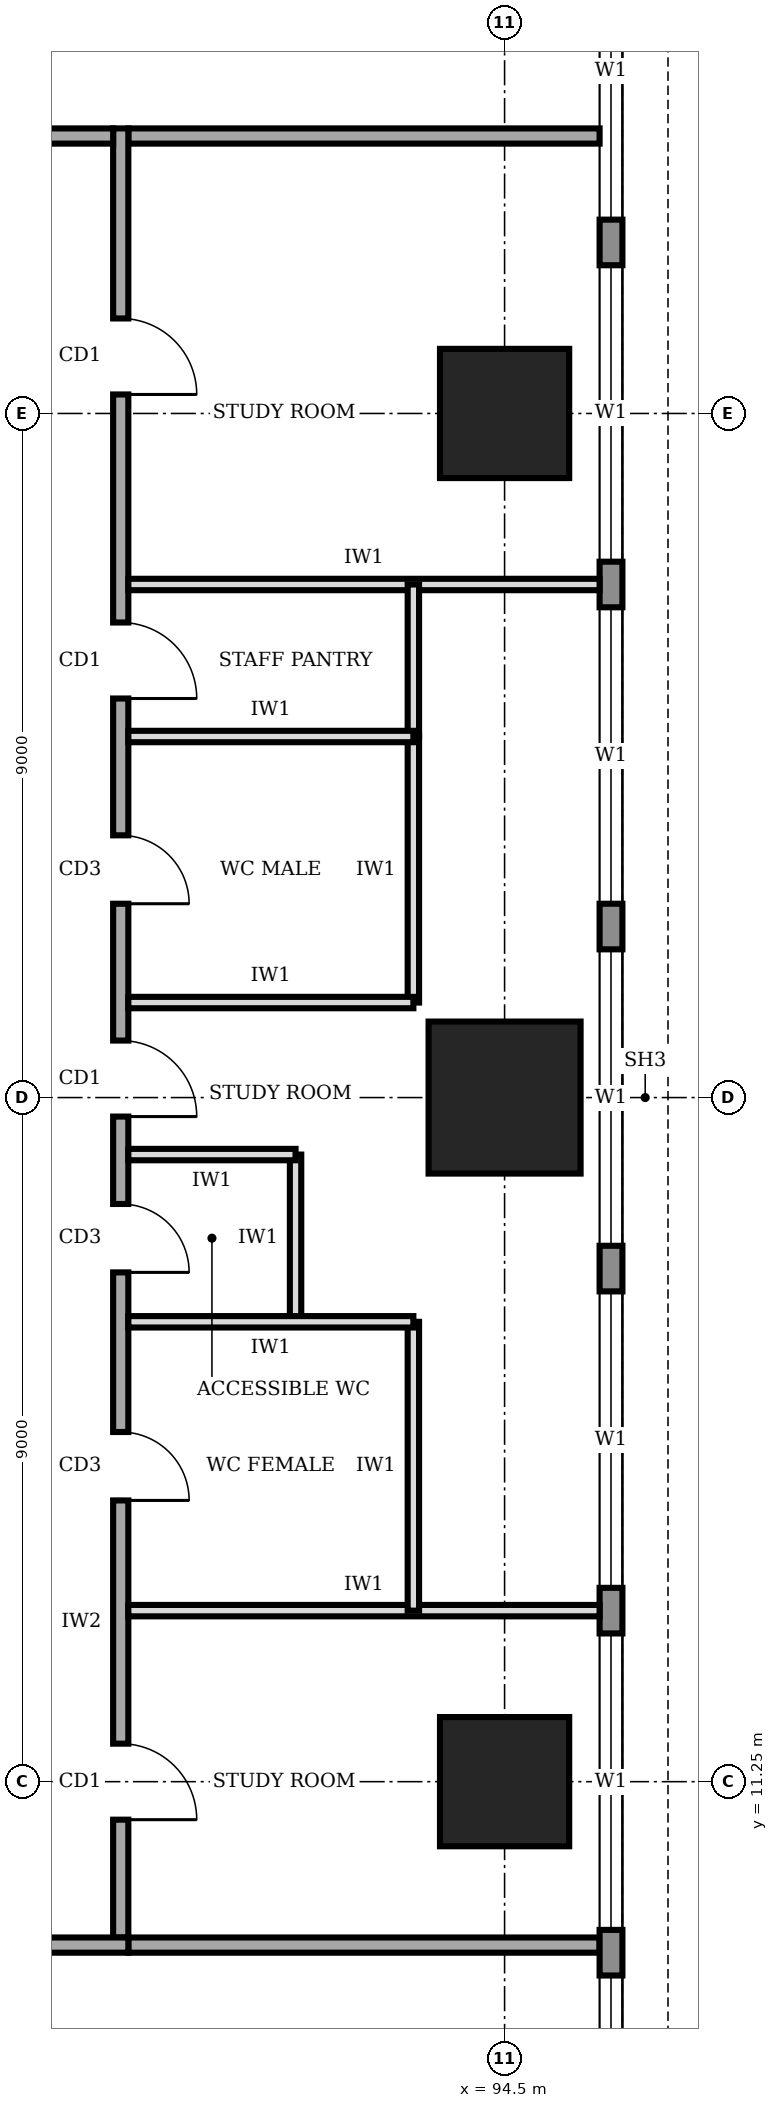
"""IFC4 building model, lengths in metres.
Left out: names, types, materials, properties, quantities, classifications, styles, units other than length and angle.
Written with IfcOpenShell. Run it as: python <this file> out.ifc"""

import sys

from ifc_helpers import new_model, si_unit, direction, frame, frame_2d, origin, origin_2d, place, context, subcontext, project, spatial, rectangle, extrude, element, fill, save


model = new_model("IFC4")
c1 = context("Model", 3, precision=1e-05, world=origin(), true_north=direction((0.0, 1.0)))
c2 = subcontext(c1, "Body", "Model", "MODEL_VIEW")
j1 = project(units=[si_unit("LENGTHUNIT", "METRE"), si_unit("PLANEANGLEUNIT", "RADIAN")], contexts=[c1])
p1 = place(None, origin())
s1 = spatial("IfcSite", under=j1, at=p1, CompositionType="ELEMENT")
p2 = place(p1, origin())
s2 = spatial("IfcBuilding", under=s1, at=p2, CompositionType="ELEMENT")
p3 = place(p2, frame((0.0, 0.0, 225.0)))
s3 = spatial("IfcBuildingStorey", under=s2, at=p3, CompositionType="ELEMENT", Elevation=225.0)
p4 = place(p3, frame((94.5, 11.25, 0.0), z_axis=(0.0, 0.0, 1.0), x_axis=(1.0, 0.0, 0.0)))
e1 = element("IfcColumn", 1, at=p4, inside=s3, PredefinedType="COLUMN", context=c2, shape_type="SweptSolid", body=[
    extrude(rectangle(XDim=1.7, YDim=1.7, at=origin_2d()), origin(), (0.0, 0.0, 1.0), 4.0),
])
p5 = place(p3, frame((94.5, 20.25, 0.0), z_axis=(0.0, 0.0, 1.0), x_axis=(1.0, 0.0, 0.0)))
e2 = element("IfcColumn", 2, at=p5, inside=s3, PredefinedType="COLUMN", context=c2, shape_type="SweptSolid", body=[
    extrude(rectangle(XDim=2.0, YDim=2.0, at=origin_2d()), origin(), (0.0, 0.0, 1.0), 4.0),
])
p6 = place(p3, frame((94.5, 29.25, 0.0), z_axis=(0.0, 0.0, 1.0), x_axis=(1.0, 0.0, 0.0)))
e3 = element("IfcColumn", 3, at=p6, inside=s3, PredefinedType="COLUMN", context=c2, shape_type="SweptSolid", body=[
    extrude(rectangle(XDim=1.7, YDim=1.7, at=origin_2d()), origin(), (0.0, 0.0, 1.0), 4.0),
])
p7 = place(p3, frame((95.9, 3.32, 0.0), z_axis=(0.0, 0.0, 1.0), x_axis=(0.0, 1.0, 0.0)))
e4 = element("IfcWall", 4, at=p7, inside=s3, PredefinedType="STANDARD", context=c2, shape_type="SweptSolid", body=[
    extrude(rectangle(XDim=33.86, YDim=0.3, at=frame_2d((16.93, 0.0))), origin(), (0.0, 0.0, 1.0), 3.75),
])
p8 = place(p7, frame((1.48, 0.0, 0.9)))
e5 = element("IfcOpeningElement", 5, at=p8, cuts=e4, PredefinedType="OPENING", context=c2, shape_type="SweptSolid", body=[
    extrude(rectangle(XDim=3.9, YDim=2.2, at=frame_2d((1.95, 1.1))), frame((0.0, 0.16, 0.0), z_axis=(0.0, -1.0, 0.0), x_axis=(1.0, 0.0, 0.0)), (0.0, 0.0, 1.0), 0.32),
])
p9 = place(p7, frame((5.98, 0.0, 0.9)))
e6 = element("IfcOpeningElement", 6, at=p9, cuts=e4, PredefinedType="OPENING", context=c2, shape_type="SweptSolid", body=[
    extrude(rectangle(XDim=3.9, YDim=2.2, at=frame_2d((1.95, 1.1))), frame((0.0, 0.16, 0.0), z_axis=(0.0, -1.0, 0.0), x_axis=(1.0, 0.0, 0.0)), (0.0, 0.0, 1.0), 0.32),
])
p10 = place(p7, frame((10.48, 0.0, 0.9)))
e7 = element("IfcOpeningElement", 7, at=p10, cuts=e4, PredefinedType="OPENING", context=c2, shape_type="SweptSolid", body=[
    extrude(rectangle(XDim=3.9, YDim=2.2, at=frame_2d((1.95, 1.1))), frame((0.0, 0.16, 0.0), z_axis=(0.0, -1.0, 0.0), x_axis=(1.0, 0.0, 0.0)), (0.0, 0.0, 1.0), 0.32),
])
p11 = place(p7, frame((14.98, 0.0, 0.9)))
e8 = element("IfcOpeningElement", 8, at=p11, cuts=e4, PredefinedType="OPENING", context=c2, shape_type="SweptSolid", body=[
    extrude(rectangle(XDim=3.9, YDim=2.2, at=frame_2d((1.95, 1.1))), frame((0.0, 0.16, 0.0), z_axis=(0.0, -1.0, 0.0), x_axis=(1.0, 0.0, 0.0)), (0.0, 0.0, 1.0), 0.32),
])
p12 = place(p7, frame((19.48, 0.0, 0.9)))
e9 = element("IfcOpeningElement", 9, at=p12, cuts=e4, PredefinedType="OPENING", context=c2, shape_type="SweptSolid", body=[
    extrude(rectangle(XDim=3.9, YDim=2.2, at=frame_2d((1.95, 1.1))), frame((0.0, 0.16, 0.0), z_axis=(0.0, -1.0, 0.0), x_axis=(1.0, 0.0, 0.0)), (0.0, 0.0, 1.0), 0.32),
])
p13 = place(p7, frame((23.98, 0.0, 0.9)))
e10 = element("IfcOpeningElement", 10, at=p13, cuts=e4, PredefinedType="OPENING", context=c2, shape_type="SweptSolid", body=[
    extrude(rectangle(XDim=3.9, YDim=2.2, at=frame_2d((1.95, 1.1))), frame((0.0, 0.16, 0.0), z_axis=(0.0, -1.0, 0.0), x_axis=(1.0, 0.0, 0.0)), (0.0, 0.0, 1.0), 0.32),
])
p14 = place(p7, frame((28.48, 0.0, 0.9)))
e11 = element("IfcOpeningElement", 11, at=p14, cuts=e4, PredefinedType="OPENING", context=c2, shape_type="SweptSolid", body=[
    extrude(rectangle(XDim=3.9, YDim=2.2, at=frame_2d((1.95, 1.1))), frame((0.0, 0.16, 0.0), z_axis=(0.0, -1.0, 0.0), x_axis=(1.0, 0.0, 0.0)), (0.0, 0.0, 1.0), 0.32),
])
p15 = place(p3, frame((72.65, 9.1, 0.0), z_axis=(0.0, 0.0, 1.0), x_axis=(1.0, 0.0, 0.0)))
e12 = element("IfcWall", 12, at=p15, inside=s3, PredefinedType="SOLIDWALL", context=c2, shape_type="SweptSolid", body=[
    extrude(rectangle(XDim=16.9, YDim=0.2, at=frame_2d((8.45, 0.0))), origin(), (0.0, 0.0, 1.0), 3.75),
])
p16 = place(p3, frame((89.45, 9.2, 0.0), z_axis=(0.0, 0.0, 1.0), x_axis=(0.0, 1.0, 0.0)))
e13 = element("IfcWall", 13, at=p16, inside=s3, PredefinedType="SOLIDWALL", context=c2, shape_type="SweptSolid", body=[
    extrude(rectangle(XDim=23.8, YDim=0.2, at=frame_2d((11.9, 0.0))), origin(), (0.0, 0.0, 1.0), 3.75),
])
p17 = place(p16, frame((1.55, 0.0, 0.0)))
e14 = element("IfcOpeningElement", 14, at=p17, cuts=e13, PredefinedType="OPENING", context=c2, shape_type="SweptSolid", body=[
    extrude(rectangle(XDim=1.0, YDim=2.1, at=frame_2d((0.5, 1.05))), frame((0.0, 0.11, 0.0), z_axis=(0.0, -1.0, 0.0), x_axis=(1.0, 0.0, 0.0)), (0.0, 0.0, 1.0), 0.22),
])
p18 = place(p16, frame((5.75, 0.0, 0.0)))
e15 = element("IfcOpeningElement", 15, at=p18, cuts=e13, PredefinedType="OPENING", context=c2, shape_type="SweptSolid", body=[
    extrude(rectangle(XDim=0.9, YDim=2.1, at=frame_2d((0.45, 1.05))), frame((0.0, 0.11, 0.0), z_axis=(0.0, -1.0, 0.0), x_axis=(1.0, 0.0, 0.0)), (0.0, 0.0, 1.0), 0.22),
])
p19 = place(p16, frame((8.75, 0.0, 0.0)))
e16 = element("IfcOpeningElement", 16, at=p19, cuts=e13, PredefinedType="OPENING", context=c2, shape_type="SweptSolid", body=[
    extrude(rectangle(XDim=0.9, YDim=2.1, at=frame_2d((0.45, 1.05))), frame((0.0, 0.11, 0.0), z_axis=(0.0, -1.0, 0.0), x_axis=(1.0, 0.0, 0.0)), (0.0, 0.0, 1.0), 0.22),
])
p20 = place(p16, frame((13.6, 0.0, 0.0)))
e17 = element("IfcOpeningElement", 17, at=p20, cuts=e13, PredefinedType="OPENING", context=c2, shape_type="SweptSolid", body=[
    extrude(rectangle(XDim=0.9, YDim=2.1, at=frame_2d((0.45, 1.05))), frame((0.0, 0.11, 0.0), z_axis=(0.0, -1.0, 0.0), x_axis=(1.0, 0.0, 0.0)), (0.0, 0.0, 1.0), 0.22),
])
p21 = place(p16, frame((16.3, 0.0, 0.0)))
e18 = element("IfcOpeningElement", 18, at=p21, cuts=e13, PredefinedType="OPENING", context=c2, shape_type="SweptSolid", body=[
    extrude(rectangle(XDim=1.0, YDim=2.1, at=frame_2d((0.5, 1.05))), frame((0.0, 0.11, 0.0), z_axis=(0.0, -1.0, 0.0), x_axis=(1.0, 0.0, 0.0)), (0.0, 0.0, 1.0), 0.22),
])
p22 = place(p16, frame((10.8, 0.0, 0.0)))
e19 = element("IfcOpeningElement", 19, at=p22, cuts=e13, PredefinedType="OPENING", context=c2, shape_type="SweptSolid", body=[
    extrude(rectangle(XDim=1.0, YDim=2.1, at=frame_2d((0.5, 1.05))), frame((0.0, 0.11, 0.0), z_axis=(0.0, -1.0, 0.0), x_axis=(1.0, 0.0, 0.0)), (0.0, 0.0, 1.0), 0.22),
])
p23 = place(p16, frame((20.3, 0.0, 0.0)))
e20 = element("IfcOpeningElement", 20, at=p23, cuts=e13, PredefinedType="OPENING", context=c2, shape_type="SweptSolid", body=[
    extrude(rectangle(XDim=1.0, YDim=2.1, at=frame_2d((0.5, 1.05))), frame((0.0, 0.11, 0.0), z_axis=(0.0, -1.0, 0.0), x_axis=(1.0, 0.0, 0.0)), (0.0, 0.0, 1.0), 0.22),
])
p24 = place(p3, frame((89.35, 32.9, 0.0), z_axis=(0.0, 0.0, 1.0), x_axis=(-1.0, 0.0, 0.0)))
e21 = element("IfcWall", 21, at=p24, inside=s3, PredefinedType="SOLIDWALL", context=c2, shape_type="SweptSolid", body=[
    extrude(rectangle(XDim=16.9, YDim=0.2, at=frame_2d((8.45, 0.0))), origin(), (0.0, 0.0, 1.0), 3.75),
])
p25 = place(p24, frame((14.375, 0.0, 0.0)))
e22 = element("IfcOpeningElement", 22, at=p25, cuts=e21, PredefinedType="OPENING", context=c2, shape_type="SweptSolid", body=[
    extrude(rectangle(XDim=1.0, YDim=2.1, at=frame_2d((0.5, 1.05))), frame((0.0, 0.11, 0.0), z_axis=(0.0, -1.0, 0.0), x_axis=(1.0, 0.0, 0.0)), (0.0, 0.0, 1.0), 0.22),
])
p26 = place(p24, frame((1.325, 0.0, 0.0)))
e23 = element("IfcOpeningElement", 23, at=p26, cuts=e21, PredefinedType="OPENING", context=c2, shape_type="SweptSolid", body=[
    extrude(rectangle(XDim=1.0, YDim=2.1, at=frame_2d((0.5, 1.05))), frame((0.0, 0.11, 0.0), z_axis=(0.0, -1.0, 0.0), x_axis=(1.0, 0.0, 0.0)), (0.0, 0.0, 1.0), 0.22),
])
for number, where, z_axis, x_axis in (
    (24, (89.55, 9.1, 0.0), (0.0, 0.0, 1.0), (1.0, 0.0, 0.0)),
    (25, (89.55, 32.9, 0.0), (0.0, 0.0, 1.0), (1.0, 0.0, 0.0)),
):
    element("IfcWall", number, at=place(p3, frame(where, z_axis=z_axis, x_axis=x_axis)), inside=s3, PredefinedType="SOLIDWALL", context=c2, shape_type="SweptSolid", body=[
        extrude(rectangle(XDim=6.2, YDim=0.2, at=frame_2d((3.1, 0.0))), origin(), (0.0, 0.0, 1.0), 3.75),
    ])
for number, where, z_axis, x_axis in (
    (26, (89.55, 13.5, 0.0), (0.0, 0.0, 1.0), (1.0, 0.0, 0.0)),
    (27, (89.55, 27.0, 0.0), (0.0, 0.0, 1.0), (1.0, 0.0, 0.0)),
):
    element("IfcWall", number, at=place(p3, frame(where, z_axis=z_axis, x_axis=x_axis)), inside=s3, PredefinedType="PARTITIONING", context=c2, shape_type="SweptSolid", body=[
        extrude(rectangle(XDim=6.2, YDim=0.15, at=frame_2d((3.1, 0.0))), origin(), (0.0, 0.0, 1.0), 3.75),
    ])
p27 = place(p3, frame((89.55, 17.3, 0.0), z_axis=(0.0, 0.0, 1.0), x_axis=(1.0, 0.0, 0.0)))
e28 = element("IfcWall", 28, at=p27, inside=s3, PredefinedType="PARTITIONING", context=c2, shape_type="SweptSolid", body=[
    extrude(rectangle(XDim=3.75, YDim=0.15, at=frame_2d((1.875, 0.0))), origin(), (0.0, 0.0, 1.0), 3.75),
])
p28 = place(p3, frame((89.55, 19.5, 0.0), z_axis=(0.0, 0.0, 1.0), x_axis=(1.0, 0.0, 0.0)))
e29 = element("IfcWall", 29, at=p28, inside=s3, PredefinedType="PARTITIONING", context=c2, shape_type="SweptSolid", body=[
    extrude(rectangle(XDim=2.2, YDim=0.15, at=frame_2d((1.1, 0.0))), origin(), (0.0, 0.0, 1.0), 2.85),
])
for number, where, z_axis, x_axis in (
    (30, (89.55, 21.5, 0.0), (0.0, 0.0, 1.0), (1.0, 0.0, 0.0)),
    (31, (89.55, 25.0, 0.0), (0.0, 0.0, 1.0), (1.0, 0.0, 0.0)),
):
    element("IfcWall", number, at=place(p3, frame(where, z_axis=z_axis, x_axis=x_axis)), inside=s3, PredefinedType="PARTITIONING", context=c2, shape_type="SweptSolid", body=[
        extrude(rectangle(XDim=3.75, YDim=0.15, at=frame_2d((1.875, 0.0))), origin(), (0.0, 0.0, 1.0), 3.75),
    ])
p29 = place(p3, frame((93.3, 13.5, 0.0), z_axis=(0.0, 0.0, 1.0), x_axis=(0.0, 1.0, 0.0)))
e32 = element("IfcWall", 32, at=p29, inside=s3, PredefinedType="PARTITIONING", context=c2, shape_type="SweptSolid", body=[
    extrude(rectangle(XDim=3.8, YDim=0.15, at=frame_2d((1.9, 0.0))), origin(), (0.0, 0.0, 1.0), 3.75),
])
p30 = place(p3, frame((91.75, 17.3, 0.0), z_axis=(0.0, 0.0, 1.0), x_axis=(0.0, 1.0, 0.0)))
e33 = element("IfcWall", 33, at=p30, inside=s3, PredefinedType="PARTITIONING", context=c2, shape_type="SweptSolid", body=[
    extrude(rectangle(XDim=2.2, YDim=0.15, at=frame_2d((1.1, 0.0))), origin(), (0.0, 0.0, 1.0), 3.75),
])
p31 = place(p3, frame((93.3, 21.5, 0.0), z_axis=(0.0, 0.0, 1.0), x_axis=(0.0, 1.0, 0.0)))
e34 = element("IfcWall", 34, at=p31, inside=s3, PredefinedType="PARTITIONING", context=c2, shape_type="SweptSolid", body=[
    extrude(rectangle(XDim=3.5, YDim=0.15, at=frame_2d((1.75, 0.0))), origin(), (0.0, 0.0, 1.0), 3.75),
])
p32 = place(p3, frame((93.3, 25.0, 0.0), z_axis=(0.0, 0.0, 1.0), x_axis=(0.0, 1.0, 0.0)))
e35 = element("IfcWall", 35, at=p32, inside=s3, PredefinedType="PARTITIONING", context=c2, shape_type="SweptSolid", body=[
    extrude(rectangle(XDim=2.0, YDim=0.15, at=frame_2d((1.0, 0.0))), origin(), (0.0, 0.0, 1.0), 3.75),
])
p33 = place(p8, origin())
e36 = element("IfcWindow", 36, at=p33, inside=s3, PartitioningType="SINGLE_PANEL", PredefinedType="WINDOW", context=c2, shape_type="SweptSolid", body=[
    extrude(rectangle(XDim=3.9, YDim=2.2, at=frame_2d((1.95, 1.1))), frame((0.0, 0.03, 0.0), z_axis=(0.0, -1.0, 0.0), x_axis=(1.0, 0.0, 0.0)), (0.0, 0.0, 1.0), 0.06),
])
fill(e5, e36)
p34 = place(p9, origin())
e37 = element("IfcWindow", 37, at=p34, inside=s3, PartitioningType="SINGLE_PANEL", PredefinedType="WINDOW", context=c2, shape_type="SweptSolid", body=[
    extrude(rectangle(XDim=3.9, YDim=2.2, at=frame_2d((1.95, 1.1))), frame((0.0, 0.03, 0.0), z_axis=(0.0, -1.0, 0.0), x_axis=(1.0, 0.0, 0.0)), (0.0, 0.0, 1.0), 0.06),
])
fill(e6, e37)
p35 = place(p10, origin())
e38 = element("IfcWindow", 38, at=p35, inside=s3, PartitioningType="SINGLE_PANEL", PredefinedType="WINDOW", context=c2, shape_type="SweptSolid", body=[
    extrude(rectangle(XDim=3.9, YDim=2.2, at=frame_2d((1.95, 1.1))), frame((0.0, 0.03, 0.0), z_axis=(0.0, -1.0, 0.0), x_axis=(1.0, 0.0, 0.0)), (0.0, 0.0, 1.0), 0.06),
])
fill(e7, e38)
p36 = place(p11, origin())
e39 = element("IfcWindow", 39, at=p36, inside=s3, PartitioningType="SINGLE_PANEL", PredefinedType="WINDOW", context=c2, shape_type="SweptSolid", body=[
    extrude(rectangle(XDim=3.9, YDim=2.2, at=frame_2d((1.95, 1.1))), frame((0.0, 0.03, 0.0), z_axis=(0.0, -1.0, 0.0), x_axis=(1.0, 0.0, 0.0)), (0.0, 0.0, 1.0), 0.06),
])
fill(e8, e39)
p37 = place(p12, origin())
e40 = element("IfcWindow", 40, at=p37, inside=s3, PartitioningType="SINGLE_PANEL", PredefinedType="WINDOW", context=c2, shape_type="SweptSolid", body=[
    extrude(rectangle(XDim=3.9, YDim=2.2, at=frame_2d((1.95, 1.1))), frame((0.0, 0.03, 0.0), z_axis=(0.0, -1.0, 0.0), x_axis=(1.0, 0.0, 0.0)), (0.0, 0.0, 1.0), 0.06),
])
fill(e9, e40)
p38 = place(p13, origin())
e41 = element("IfcWindow", 41, at=p38, inside=s3, PartitioningType="SINGLE_PANEL", PredefinedType="WINDOW", context=c2, shape_type="SweptSolid", body=[
    extrude(rectangle(XDim=3.9, YDim=2.2, at=frame_2d((1.95, 1.1))), frame((0.0, 0.03, 0.0), z_axis=(0.0, -1.0, 0.0), x_axis=(1.0, 0.0, 0.0)), (0.0, 0.0, 1.0), 0.06),
])
fill(e10, e41)
p39 = place(p14, origin())
e42 = element("IfcWindow", 42, at=p39, inside=s3, PartitioningType="SINGLE_PANEL", PredefinedType="WINDOW", context=c2, shape_type="SweptSolid", body=[
    extrude(rectangle(XDim=3.9, YDim=2.2, at=frame_2d((1.95, 1.1))), frame((0.0, 0.03, 0.0), z_axis=(0.0, -1.0, 0.0), x_axis=(1.0, 0.0, 0.0)), (0.0, 0.0, 1.0), 0.06),
])
fill(e11, e42)
p40 = place(p17, frame((1.0, 0.0, 0.0), z_axis=(0.0, 0.0, 1.0), x_axis=(-1.0, 0.0, 0.0)))
e43 = element("IfcDoor", 43, at=p40, inside=s3, OperationType="SINGLE_SWING_RIGHT", PredefinedType="DOOR", context=c2, shape_type="SweptSolid", body=[
    extrude(rectangle(XDim=1.0, YDim=2.1, at=frame_2d((0.5, 1.05))), frame((0.0, 0.025, 0.0), z_axis=(0.0, -1.0, 0.0), x_axis=(1.0, 0.0, 0.0)), (0.0, 0.0, 1.0), 0.05),
])
fill(e14, e43)
p41 = place(p18, frame((0.9, 0.0, 0.0), z_axis=(0.0, 0.0, 1.0), x_axis=(-1.0, 0.0, 0.0)))
e44 = element("IfcDoor", 44, at=p41, inside=s3, OperationType="SINGLE_SWING_RIGHT", PredefinedType="DOOR", context=c2, shape_type="SweptSolid", body=[
    extrude(rectangle(XDim=0.9, YDim=2.1, at=frame_2d((0.45, 1.05))), frame((0.0, 0.025, 0.0), z_axis=(0.0, -1.0, 0.0), x_axis=(1.0, 0.0, 0.0)), (0.0, 0.0, 1.0), 0.05),
])
fill(e15, e44)
p42 = place(p19, frame((0.9, 0.0, 0.0), z_axis=(0.0, 0.0, 1.0), x_axis=(-1.0, 0.0, 0.0)))
e45 = element("IfcDoor", 45, at=p42, inside=s3, OperationType="SINGLE_SWING_RIGHT", PredefinedType="DOOR", context=c2, shape_type="SweptSolid", body=[
    extrude(rectangle(XDim=0.9, YDim=2.1, at=frame_2d((0.45, 1.05))), frame((0.0, 0.025, 0.0), z_axis=(0.0, -1.0, 0.0), x_axis=(1.0, 0.0, 0.0)), (0.0, 0.0, 1.0), 0.05),
])
fill(e16, e45)
p43 = place(p20, frame((0.9, 0.0, 0.0), z_axis=(0.0, 0.0, 1.0), x_axis=(-1.0, 0.0, 0.0)))
e46 = element("IfcDoor", 46, at=p43, inside=s3, OperationType="SINGLE_SWING_RIGHT", PredefinedType="DOOR", context=c2, shape_type="SweptSolid", body=[
    extrude(rectangle(XDim=0.9, YDim=2.1, at=frame_2d((0.45, 1.05))), frame((0.0, 0.025, 0.0), z_axis=(0.0, -1.0, 0.0), x_axis=(1.0, 0.0, 0.0)), (0.0, 0.0, 1.0), 0.05),
])
fill(e17, e46)
p44 = place(p21, frame((1.0, 0.0, 0.0), z_axis=(0.0, 0.0, 1.0), x_axis=(-1.0, 0.0, 0.0)))
e47 = element("IfcDoor", 47, at=p44, inside=s3, OperationType="SINGLE_SWING_RIGHT", PredefinedType="DOOR", context=c2, shape_type="SweptSolid", body=[
    extrude(rectangle(XDim=1.0, YDim=2.1, at=frame_2d((0.5, 1.05))), frame((0.0, 0.025, 0.0), z_axis=(0.0, -1.0, 0.0), x_axis=(1.0, 0.0, 0.0)), (0.0, 0.0, 1.0), 0.05),
])
fill(e18, e47)
p45 = place(p22, frame((1.0, 0.0, 0.0), z_axis=(0.0, 0.0, 1.0), x_axis=(-1.0, 0.0, 0.0)))
e48 = element("IfcDoor", 48, at=p45, inside=s3, OperationType="SINGLE_SWING_RIGHT", PredefinedType="DOOR", context=c2, shape_type="SweptSolid", body=[
    extrude(rectangle(XDim=1.0, YDim=2.1, at=frame_2d((0.5, 1.05))), frame((0.0, 0.025, 0.0), z_axis=(0.0, -1.0, 0.0), x_axis=(1.0, 0.0, 0.0)), (0.0, 0.0, 1.0), 0.05),
])
fill(e19, e48)
p46 = place(p23, frame((1.0, 0.0, 0.0), z_axis=(0.0, 0.0, 1.0), x_axis=(-1.0, 0.0, 0.0)))
e49 = element("IfcDoor", 49, at=p46, inside=s3, OperationType="SINGLE_SWING_RIGHT", PredefinedType="DOOR", context=c2, shape_type="SweptSolid", body=[
    extrude(rectangle(XDim=1.0, YDim=2.1, at=frame_2d((0.5, 1.05))), frame((0.0, 0.025, 0.0), z_axis=(0.0, -1.0, 0.0), x_axis=(1.0, 0.0, 0.0)), (0.0, 0.0, 1.0), 0.05),
])
fill(e20, e49)
save(model, sys.argv[1])
